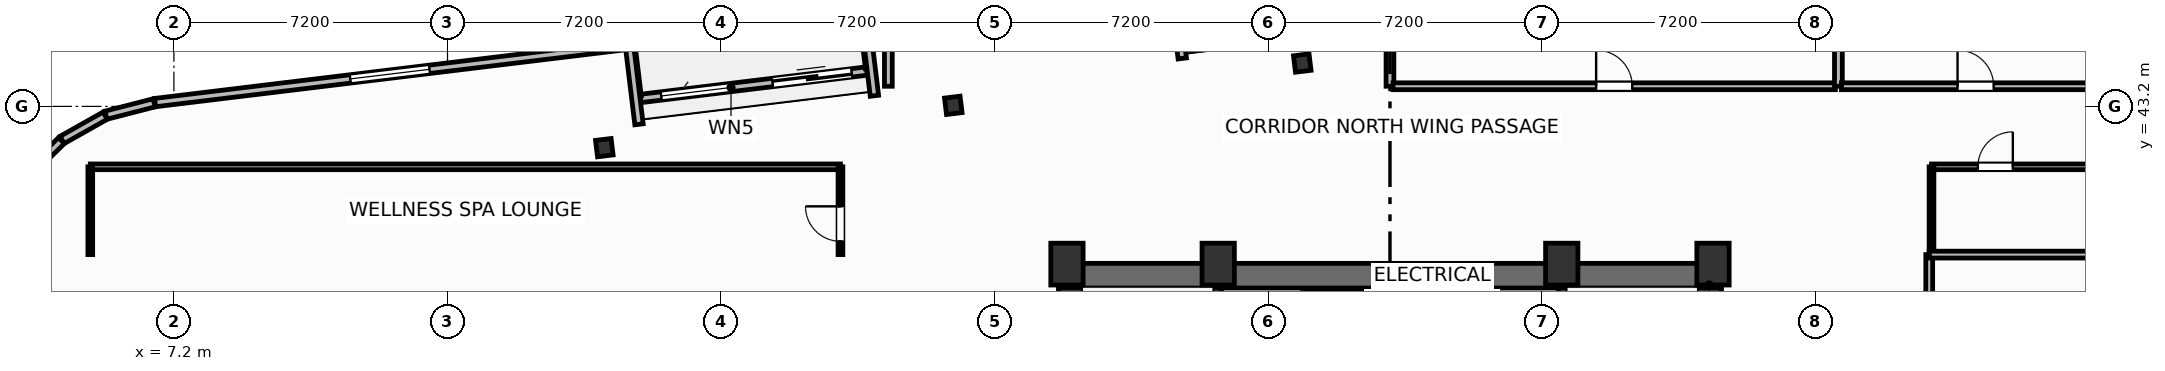
"""IFC4 building model, lengths in metres.
Left out: names, types, materials, properties, quantities, classifications, styles, units other than length and angle.
Written with IfcOpenShell. Run it as: python <this file> out.ifc"""

import sys

from ifc_helpers import new_model, si_unit, direction, frame, frame_2d, origin, origin_2d, place, context, subcontext, project, spatial, rectangle, i_section, extrude, element, fill, save


model = new_model("IFC4")
c1 = context("Model", 3, precision=1e-05, world=origin(), true_north=direction((0.0, 1.0)))
c2 = subcontext(c1, "Body", "Model", "MODEL_VIEW")
j1 = project(units=[si_unit("LENGTHUNIT", "METRE"), si_unit("PLANEANGLEUNIT", "RADIAN")], contexts=[c1])
p1 = place(None, origin())
s1 = spatial("IfcSite", under=j1, at=p1, CompositionType="ELEMENT")
p2 = place(p1, origin())
s2 = spatial("IfcBuilding", under=s1, at=p2, CompositionType="ELEMENT")
p3 = place(p2, frame((0.0, 0.0, 204.2)))
s3 = spatial("IfcBuildingStorey", under=s2, at=p3, CompositionType="ELEMENT", Elevation=204.2)
for number, where, z_axis, x_axis in (
    (1, (30.7, 39.05, 0.0), (0.0, 0.0, 1.0), (1.0, 0.0, 0.0)),
    (2, (34.68, 39.05, 0.0), (0.0, 0.0, 1.0), (1.0, 0.0, 0.0)),
    (3, (43.72, 39.05, 0.0), (0.0, 0.0, 1.0), (1.0, 0.0, 0.0)),
    (4, (47.7, 39.05, 0.0), (0.0, 0.0, 1.0), (1.0, 0.0, 0.0)),
):
    element("IfcColumn", number, at=place(p3, frame(where, z_axis=z_axis, x_axis=x_axis)), inside=s3, PredefinedType="COLUMN", context=c2, shape_type="SweptSolid", body=[
        extrude(rectangle(XDim=0.85, YDim=1.1, at=origin_2d()), origin(), (0.0, 0.0, 1.0), 3.7),
    ])
p4 = place(p3, frame((30.48, 38.745, 0.0), z_axis=(0.0, 0.0, 1.0), x_axis=(1.0, 0.0, 0.0)))
e5 = element("IfcWall", 5, at=p4, inside=s3, PredefinedType="SHEAR", context=c2, shape_type="SweptSolid", body=[
    extrude(rectangle(XDim=17.44, YDim=0.65, at=frame_2d((8.72, 0.0))), origin(), (0.0, 0.0, 1.0), 3.38),
])
for number, where, z_axis, x_axis in (
    (6, (30.805, 29.2, 0.0), (0.0, 0.0, 1.0), (0.0, 1.0, 0.0)),
    (7, (47.595, 29.2, 0.0), (0.0, 0.0, 1.0), (0.0, 1.0, 0.0)),
):
    element("IfcWall", number, at=place(p3, frame(where, z_axis=z_axis, x_axis=x_axis)), inside=s3, PredefinedType="SHEAR", context=c2, shape_type="SweptSolid", body=[
        extrude(rectangle(XDim=9.22, YDim=0.65, at=frame_2d((4.61, 0.0))), origin(), (0.0, 0.0, 1.0), 3.38),
    ])
p5 = place(p3, frame((34.64, 29.2, 0.0), z_axis=(0.0, 0.0, 1.0), x_axis=(0.0, 1.0, 0.0)))
e8 = element("IfcWall", 8, at=p5, inside=s3, PredefinedType="SHEAR", context=c2, shape_type="SweptSolid", body=[
    extrude(rectangle(XDim=9.22, YDim=0.25, at=frame_2d((4.61, 0.0))), origin(), (0.0, 0.0, 1.0), 3.38),
])
p6 = place(p5, frame((0.65, 0.0, 0.0)))
e9 = element("IfcOpeningElement", 9, at=p6, cuts=e8, PredefinedType="OPENING", context=c2, shape_type="SweptSolid", body=[
    extrude(rectangle(XDim=1.05, YDim=2.15, at=frame_2d((0.525, 1.075))), frame((0.0, 0.135, 0.0), z_axis=(0.0, -1.0, 0.0), x_axis=(1.0, 0.0, 0.0)), (0.0, 0.0, 1.0), 0.27),
])
p7 = place(p3, frame((43.76, 29.2, 0.0), z_axis=(0.0, 0.0, 1.0), x_axis=(0.0, 1.0, 0.0)))
e10 = element("IfcWall", 10, at=p7, inside=s3, PredefinedType="SHEAR", context=c2, shape_type="SweptSolid", body=[
    extrude(rectangle(XDim=9.22, YDim=0.25, at=frame_2d((4.61, 0.0))), origin(), (0.0, 0.0, 1.0), 3.38),
])
p8 = place(p7, frame((0.65, 0.0, 0.0)))
e11 = element("IfcOpeningElement", 11, at=p8, cuts=e10, PredefinedType="OPENING", context=c2, shape_type="SweptSolid", body=[
    extrude(rectangle(XDim=1.05, YDim=2.15, at=frame_2d((0.525, 1.075))), frame((0.0, 0.135, 0.0), z_axis=(0.0, -1.0, 0.0), x_axis=(1.0, 0.0, 0.0)), (0.0, 0.0, 1.0), 0.27),
])
for number, where, z_axis, x_axis in (
    (12, (36.892, 44.341, 0.0), (0.0, 0.0, 1.0), (0.993, 0.12, 0.0)),
    (13, (27.709, 43.227, 0.0), (0.0, 0.0, 1.0), (0.993, 0.12, 0.0)),
    (14, (18.526, 42.114, 0.0), (0.0, 0.0, 1.0), (0.993, 0.12, 0.0)),
):
    element("IfcColumn", number, at=place(p3, frame(where, z_axis=z_axis, x_axis=x_axis)), inside=s3, PredefinedType="COLUMN", context=c2, shape_type="SweptSolid", body=[
        extrude(i_section(OverallWidth=0.412, OverallDepth=0.435, WebThickness=0.036, FlangeThickness=0.057, FilletRadius=0.025, at=origin_2d()), origin(), (0.0, 0.0, 1.0), 3.7),
    ])
p9 = place(p3, frame((19.477, 43.408, 0.0), z_axis=(0.0, 0.0, 1.0), x_axis=(0.992735402148, 0.120318000826, 0.0)))
e15 = element("IfcWall", 15, at=p9, inside=s3, PredefinedType="SOLIDWALL", context=c2, shape_type="SweptSolid", body=[
    extrude(rectangle(XDim=6.0, YDim=0.22, at=frame_2d((3.0, 0.0))), origin(), (0.0, 0.0, 1.0), 2.66),
])
p10 = place(p9, frame((3.5, 0.0, 0.0)))
e16 = element("IfcOpeningElement", 16, at=p10, cuts=e15, PredefinedType="OPENING", context=c2, shape_type="SweptSolid", body=[
    extrude(rectangle(XDim=2.1, YDim=2.3, at=frame_2d((1.05, 1.15))), frame((0.0, 0.12, 0.0), z_axis=(0.0, -1.0, 0.0), x_axis=(1.0, 0.0, 0.0)), (0.0, 0.0, 1.0), 0.24),
])
p11 = place(p9, frame((0.55, 0.0, 0.75)))
e17 = element("IfcOpeningElement", 17, at=p11, cuts=e15, PredefinedType="OPENING", context=c2, shape_type="SweptSolid", body=[
    extrude(rectangle(XDim=1.85, YDim=1.75, at=frame_2d((0.925, 0.875))), frame((0.0, 0.12, 0.0), z_axis=(0.0, -1.0, 0.0), x_axis=(1.0, 0.0, 0.0)), (0.0, 0.0, 1.0), 0.24),
])
p12 = place(p3, frame((33.734, 44.461, 0.0), z_axis=(0.0, 0.0, 1.0), x_axis=(-0.120327895535, 0.992734202874, 0.0)))
e18 = element("IfcWall", 18, at=p12, inside=s3, PredefinedType="SOLIDWALL", context=c2, shape_type="SweptSolid", body=[
    extrude(rectangle(XDim=2.1, YDim=0.22, at=frame_2d((1.05, 0.0))), origin(), (0.0, 0.0, 1.0), 2.66),
])
p13 = place(p3, frame((25.396, 45.44, 0.0), z_axis=(0.0, 0.0, 1.0), x_axis=(0.120275992932, -0.992740492538, 0.0)))
e19 = element("IfcWall", 19, at=p13, inside=s3, PredefinedType="SOLIDWALL", context=c2, shape_type="SweptSolid", body=[
    extrude(rectangle(XDim=1.975, YDim=0.22, at=frame_2d((0.988, 0.0))), origin(), (0.0, 0.0, 1.0), 2.66),
])
p14 = place(p3, frame((19.439, 42.729, 0.0), z_axis=(0.0, 0.0, 1.0), x_axis=(-0.120327895535, 0.992734202874, 0.0)))
e20 = element("IfcWall", 20, at=p14, inside=s3, PredefinedType="SOLIDWALL", context=c2, shape_type="SweptSolid", body=[
    extrude(rectangle(XDim=2.1, YDim=0.22, at=frame_2d((1.05, 0.0))), origin(), (0.0, 0.0, 1.0), 2.66),
])
p15 = place(p3, frame((19.062, 44.798, 0.0), z_axis=(0.0, 0.0, 1.0), x_axis=(-0.992733569027, -0.120333124809, 0.0)))
e21 = element("IfcWall", 21, at=p15, inside=s3, PredefinedType="SOLIDWALL", context=c2, shape_type="SweptSolid", body=[
    extrude(rectangle(XDim=12.447, YDim=0.22, at=frame_2d((6.224, 0.0))), origin(), (0.0, 0.0, 1.0), 2.66),
])
p16 = place(p15, frame((5.174, 0.0, 0.8)))
e22 = element("IfcOpeningElement", 22, at=p16, cuts=e21, PredefinedType="OPENING", context=c2, shape_type="SweptSolid", body=[
    extrude(rectangle(XDim=2.1, YDim=1.75, at=frame_2d((1.05, 0.875))), frame((0.0, 0.12, 0.0), z_axis=(0.0, -1.0, 0.0), x_axis=(1.0, 0.0, 0.0)), (0.0, 0.0, 1.0), 0.24),
])
p17 = place(p3, frame((6.681, 43.294, 0.0), z_axis=(0.0, 0.0, 1.0), x_axis=(-0.968496788899, -0.2490260426, 0.0)))
e23 = element("IfcWall", 23, at=p17, inside=s3, PredefinedType="SOLIDWALL", context=c2, shape_type="SweptSolid", body=[
    extrude(rectangle(XDim=1.309, YDim=0.22, at=frame_2d((0.654, 0.0))), origin(), (0.0, 0.0, 1.0), 2.66),
])
for number, where, z_axis, x_axis in (
    (24, (5.392, 42.956, 0.0), (0.0, 0.0, 1.0), (-0.871, -0.491, 0.0)),
    (25, (4.241, 42.3, 0.0), (0.0, 0.0, 1.0), (-0.714, -0.7, 0.0)),
):
    element("IfcWall", number, at=place(p3, frame(where, z_axis=z_axis, x_axis=x_axis)), inside=s3, PredefinedType="SOLIDWALL", context=c2, shape_type="SweptSolid", body=[
        extrude(rectangle(XDim=1.301, YDim=0.22, at=frame_2d((0.65, 0.0))), origin(), (0.0, 0.0, 1.0), 2.66),
    ])
p18 = place(p3, frame((5.0, 41.61, 0.0), z_axis=(0.0, 0.0, 1.0), x_axis=(1.0, 0.0, 0.0)))
e26 = element("IfcWall", 26, at=p18, inside=s3, PredefinedType="PARTITIONING", context=c2, shape_type="SweptSolid", body=[
    extrude(rectangle(XDim=19.74, YDim=0.15, at=frame_2d((9.87, 0.0))), origin(), (0.0, 0.0, 1.0), 3.38),
])
p19 = place(p3, frame((5.0, 39.3, 0.0), z_axis=(0.0, 0.0, 1.0), x_axis=(0.0, 1.0, 0.0)))
e27 = element("IfcWall", 27, at=p19, inside=s3, PredefinedType="PARTITIONING", context=c2, shape_type="SweptSolid", body=[
    extrude(rectangle(XDim=2.31, YDim=0.125, at=frame_2d((1.155, 0.0))), origin(), (0.0, 0.0, 1.0), 3.38),
])
p20 = place(p3, frame((24.74, 39.3, 0.0), z_axis=(0.0, 0.0, 1.0), x_axis=(0.0, 1.0, 0.0)))
e28 = element("IfcWall", 28, at=p20, inside=s3, PredefinedType="PARTITIONING", context=c2, shape_type="SweptSolid", body=[
    extrude(rectangle(XDim=2.31, YDim=0.125, at=frame_2d((1.155, 0.0))), origin(), (0.0, 0.0, 1.0), 3.38),
])
p21 = place(p20, frame((0.35, 0.0, 0.0)))
e29 = element("IfcOpeningElement", 29, at=p21, cuts=e28, PredefinedType="OPENING", context=c2, shape_type="SweptSolid", body=[
    extrude(rectangle(XDim=0.92, YDim=2.05, at=frame_2d((0.46, 1.025))), frame((0.0, 0.073, 0.0), z_axis=(0.0, -1.0, 0.0), x_axis=(1.0, 0.0, 0.0)), (0.0, 0.0, 1.0), 0.145),
])
p22 = place(p3, frame((53.45, 41.61, 0.0), z_axis=(0.0, 0.0, 1.0), x_axis=(1.0, 0.0, 0.0)))
e30 = element("IfcWall", 30, at=p22, inside=s3, PredefinedType="PARTITIONING", context=c2, shape_type="SweptSolid", body=[
    extrude(rectangle(XDim=16.55, YDim=0.15, at=frame_2d((8.275, 0.0))), origin(), (0.0, 0.0, 1.0), 3.38),
])
p23 = place(p22, frame((1.22, 0.0, 0.0)))
e31 = element("IfcOpeningElement", 31, at=p23, cuts=e30, PredefinedType="OPENING", context=c2, shape_type="SweptSolid", body=[
    extrude(rectangle(XDim=0.92, YDim=2.05, at=frame_2d((0.46, 1.025))), frame((0.0, 0.085, 0.0), z_axis=(0.0, -1.0, 0.0), x_axis=(1.0, 0.0, 0.0)), (0.0, 0.0, 1.0), 0.17),
])
p24 = place(p3, frame((53.45, 39.3, 0.0), z_axis=(0.0, 0.0, 1.0), x_axis=(0.0, 1.0, 0.0)))
e32 = element("IfcWall", 32, at=p24, inside=s3, PredefinedType="PARTITIONING", context=c2, shape_type="SweptSolid", body=[
    extrude(rectangle(XDim=2.31, YDim=0.125, at=frame_2d((1.155, 0.0))), origin(), (0.0, 0.0, 1.0), 3.38),
])
p25 = place(p3, frame((26.0, 43.73, 0.0), z_axis=(0.0, 0.0, 1.0), x_axis=(0.0, 1.0, 0.0)))
e33 = element("IfcWall", 33, at=p25, inside=s3, PredefinedType="PARTITIONING", context=c2, shape_type="SweptSolid", body=[
    extrude(rectangle(XDim=1.889, YDim=0.205, at=frame_2d((0.945, 0.0))), origin(), (0.0, 0.0, 1.0), 3.38),
])
p26 = place(p3, frame((39.2, 43.73, 0.0), z_axis=(0.0, 0.0, 1.0), x_axis=(0.0, 1.0, 0.0)))
e34 = element("IfcWall", 34, at=p26, inside=s3, PredefinedType="PARTITIONING", context=c2, shape_type="SweptSolid", body=[
    extrude(rectangle(XDim=1.964, YDim=0.205, at=frame_2d((0.982, 0.0))), origin(), (0.0, 0.0, 1.0), 3.38),
])
p27 = place(p3, frame((39.28, 43.73, 0.0), z_axis=(0.0, 0.0, 1.0), x_axis=(1.0, 0.0, 0.0)))
e35 = element("IfcWall", 35, at=p27, inside=s3, PredefinedType="PARTITIONING", context=c2, shape_type="SweptSolid", body=[
    extrude(rectangle(XDim=11.64, YDim=0.18, at=frame_2d((5.82, 0.0))), origin(), (0.0, 0.0, 1.0), 3.38),
])
p28 = place(p27, frame((5.345, 0.0, 0.0)))
e36 = element("IfcOpeningElement", 36, at=p28, cuts=e35, PredefinedType="OPENING", context=c2, shape_type="SweptSolid", body=[
    extrude(rectangle(XDim=0.95, YDim=2.05, at=frame_2d((0.475, 1.025))), frame((0.0, 0.1, 0.0), z_axis=(0.0, -1.0, 0.0), x_axis=(1.0, 0.0, 0.0)), (0.0, 0.0, 1.0), 0.2),
])
p29 = place(p3, frame((51.0, 43.73, 0.0), z_axis=(0.0, 0.0, 1.0), x_axis=(0.0, 1.0, 0.0)))
e37 = element("IfcWall", 37, at=p29, inside=s3, PredefinedType="PARTITIONING", context=c2, shape_type="SweptSolid", body=[
    extrude(rectangle(XDim=3.395, YDim=0.205, at=frame_2d((1.697, 0.0))), origin(), (0.0, 0.0, 1.0), 3.38),
])
p30 = place(p3, frame((51.08, 43.73, 0.0), z_axis=(0.0, 0.0, 1.0), x_axis=(1.0, 0.0, 0.0)))
e38 = element("IfcWall", 38, at=p30, inside=s3, PredefinedType="PARTITIONING", context=c2, shape_type="SweptSolid", body=[
    extrude(rectangle(XDim=21.263, YDim=0.18, at=frame_2d((10.632, 0.0))), origin(), (0.0, 0.0, 1.0), 3.38),
])
p31 = place(p30, frame((3.055, 0.0, 0.0)))
e39 = element("IfcOpeningElement", 39, at=p31, cuts=e38, PredefinedType="OPENING", context=c2, shape_type="SweptSolid", body=[
    extrude(rectangle(XDim=0.95, YDim=2.05, at=frame_2d((0.475, 1.025))), frame((0.0, 0.1, 0.0), z_axis=(0.0, -1.0, 0.0), x_axis=(1.0, 0.0, 0.0)), (0.0, 0.0, 1.0), 0.2),
])
p32 = place(p3, frame((53.39, 19.24, 0.0), z_axis=(0.0, 0.0, 1.0), x_axis=(0.0, 1.0, 0.0)))
e40 = element("IfcWall", 40, at=p32, inside=s3, PredefinedType="PARTITIONING", context=c2, shape_type="SweptSolid", body=[
    extrude(rectangle(XDim=20.06, YDim=0.18, at=frame_2d((10.03, 0.0))), origin(), (0.0, 0.0, 1.0), 3.38),
])
p33 = place(p32, frame((7.7, 0.0, 0.0)))
e41 = element("IfcOpeningElement", 41, at=p33, cuts=e40, PredefinedType="OPENING", context=c2, shape_type="SweptSolid", body=[
    extrude(rectangle(XDim=0.95, YDim=2.05, at=frame_2d((0.475, 1.025))), frame((0.0, 0.1, 0.0), z_axis=(0.0, -1.0, 0.0), x_axis=(1.0, 0.0, 0.0)), (0.0, 0.0, 1.0), 0.2),
])
p34 = place(p3, frame((53.39, 39.3, 0.0), z_axis=(0.0, 0.0, 1.0), x_axis=(1.0, 0.0, 0.0)))
e42 = element("IfcWall", 42, at=p34, inside=s3, PredefinedType="PARTITIONING", context=c2, shape_type="SweptSolid", body=[
    extrude(rectangle(XDim=19.49, YDim=0.18, at=frame_2d((9.745, 0.0))), origin(), (0.0, 0.0, 1.0), 3.38),
])
p35 = place(p10, origin())
e43 = element("IfcDoor", 43, at=p35, inside=s3, OperationType="SLIDING_TO_LEFT", PredefinedType="DOOR", context=c2, shape_type="SweptSolid", body=[
    extrude(rectangle(XDim=2.1, YDim=2.3, at=frame_2d((1.05, 1.15))), frame((0.0, 0.025, 0.0), z_axis=(0.0, -1.0, 0.0), x_axis=(1.0, 0.0, 0.0)), (0.0, 0.0, 1.0), 0.05),
])
fill(e16, e43)
p36 = place(p11, origin())
e44 = element("IfcWindow", 44, at=p36, inside=s3, PartitioningType="SINGLE_PANEL", PredefinedType="WINDOW", context=c2, shape_type="SweptSolid", body=[
    extrude(rectangle(XDim=1.85, YDim=1.75, at=frame_2d((0.925, 0.875))), frame((0.0, 0.03, 0.0), z_axis=(0.0, -1.0, 0.0), x_axis=(1.0, 0.0, 0.0)), (0.0, 0.0, 1.0), 0.06),
])
fill(e17, e44)
p37 = place(p16, origin())
e45 = element("IfcWindow", 45, at=p37, inside=s3, PartitioningType="SINGLE_PANEL", PredefinedType="WINDOW", context=c2, shape_type="SweptSolid", body=[
    extrude(rectangle(XDim=2.1, YDim=1.75, at=frame_2d((1.05, 0.875))), frame((0.0, 0.03, 0.0), z_axis=(0.0, -1.0, 0.0), x_axis=(1.0, 0.0, 0.0)), (0.0, 0.0, 1.0), 0.06),
])
fill(e22, e45)
p38 = place(p21, origin())
e46 = element("IfcDoor", 46, at=p38, inside=s3, OperationType="SINGLE_SWING_RIGHT", PredefinedType="DOOR", context=c2, shape_type="SweptSolid", body=[
    extrude(rectangle(XDim=0.92, YDim=2.05, at=frame_2d((0.46, 1.025))), frame((0.0, 0.025, 0.0), z_axis=(0.0, -1.0, 0.0), x_axis=(1.0, 0.0, 0.0)), (0.0, 0.0, 1.0), 0.05),
])
fill(e29, e46)
p39 = place(p23, origin())
e47 = element("IfcDoor", 47, at=p39, inside=s3, OperationType="SINGLE_SWING_RIGHT", PredefinedType="DOOR", context=c2, shape_type="SweptSolid", body=[
    extrude(rectangle(XDim=0.92, YDim=2.05, at=frame_2d((0.46, 1.025))), frame((0.0, 0.025, 0.0), z_axis=(0.0, -1.0, 0.0), x_axis=(1.0, 0.0, 0.0)), (0.0, 0.0, 1.0), 0.05),
])
fill(e31, e47)
p40 = place(p28, origin())
e48 = element("IfcDoor", 48, at=p40, inside=s3, OperationType="SINGLE_SWING_LEFT", PredefinedType="DOOR", context=c2, shape_type="SweptSolid", body=[
    extrude(rectangle(XDim=0.95, YDim=2.05, at=frame_2d((0.475, 1.025))), frame((0.0, 0.025, 0.0), z_axis=(0.0, -1.0, 0.0), x_axis=(1.0, 0.0, 0.0)), (0.0, 0.0, 1.0), 0.05),
])
fill(e36, e48)
p41 = place(p31, origin())
e49 = element("IfcDoor", 49, at=p41, inside=s3, OperationType="SINGLE_SWING_LEFT", PredefinedType="DOOR", context=c2, shape_type="SweptSolid", body=[
    extrude(rectangle(XDim=0.95, YDim=2.05, at=frame_2d((0.475, 1.025))), frame((0.0, 0.025, 0.0), z_axis=(0.0, -1.0, 0.0), x_axis=(1.0, 0.0, 0.0)), (0.0, 0.0, 1.0), 0.05),
])
fill(e39, e49)
save(model, sys.argv[1])
